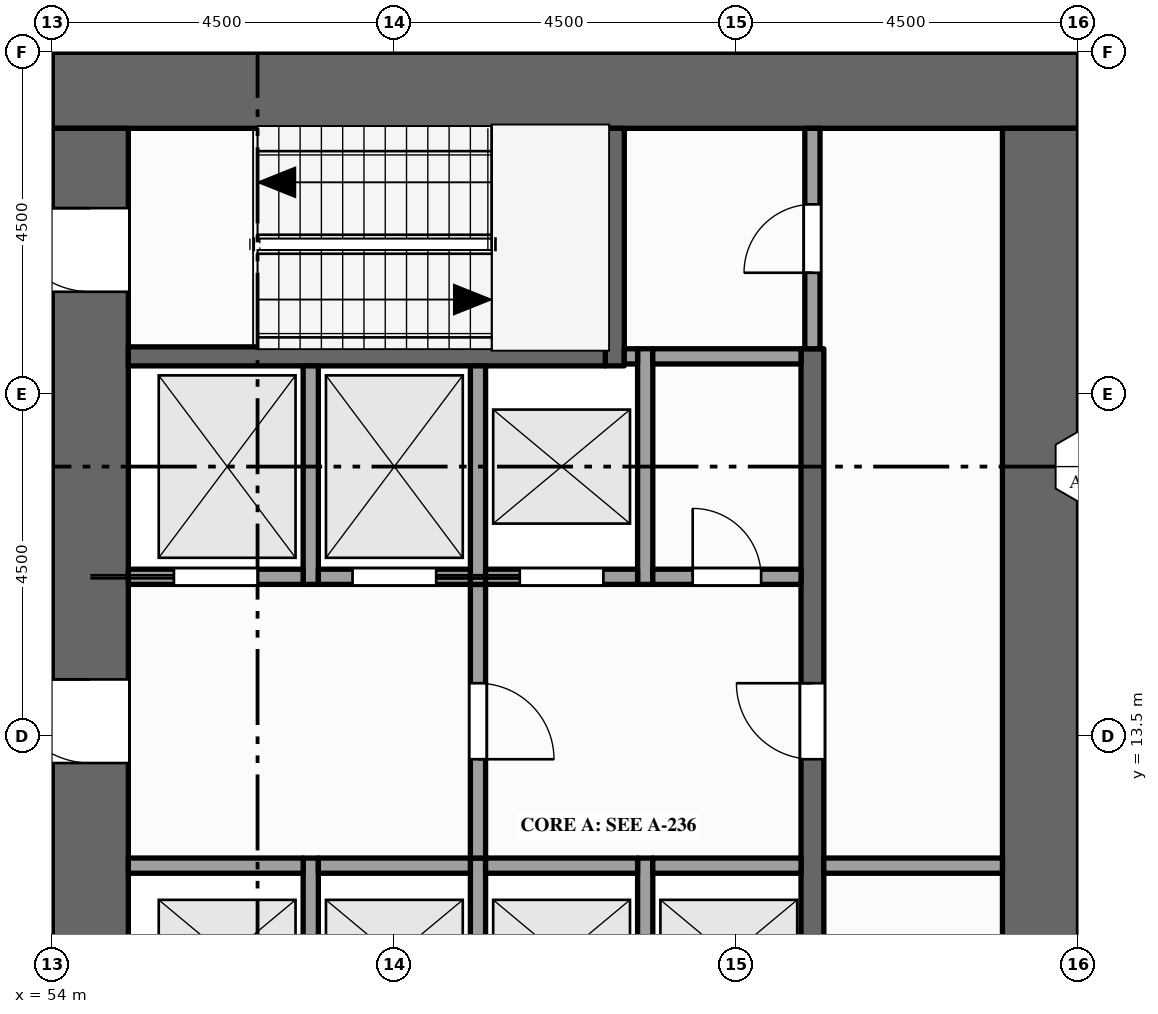
"""IFC4 building model, lengths in metres.
Left out: names, types, materials, properties, quantities, classifications, styles, units other than length and angle.
Written with IfcOpenShell. Run it as: python <this file> out.ifc"""

import sys

from ifc_helpers import new_model, si_unit, direction, frame, frame_2d, origin, place, context, subcontext, project, spatial, rectangle, extrude, element, fill, save


model = new_model("IFC4")
c1 = context("Model", 3, precision=1e-05, world=origin(), true_north=direction((0.0, 1.0)))
c2 = subcontext(c1, "Body", "Model", "MODEL_VIEW")
j1 = project(units=[si_unit("LENGTHUNIT", "METRE"), si_unit("PLANEANGLEUNIT", "RADIAN")], contexts=[c1])
p1 = place(None, origin())
s1 = spatial("IfcSite", under=j1, at=p1, CompositionType="ELEMENT")
p2 = place(p1, origin())
s2 = spatial("IfcBuilding", under=s1, at=p2, CompositionType="ELEMENT")
p3 = place(p2, frame((0.0, 0.0, 199.0)))
s3 = spatial("IfcBuildingStorey", under=s2, at=p3, CompositionType="ELEMENT", Elevation=199.0)
p4 = place(p3, frame((54.0, 22.0, -0.15), z_axis=(0.0, 0.0, 1.0), x_axis=(1.0, 0.0, 0.0)))
e1 = element("IfcWall", 1, at=p4, inside=s3, PredefinedType="SHEAR", context=c2, shape_type="SweptSolid", body=[
    extrude(rectangle(XDim=13.5, YDim=1.0, at=frame_2d((6.75, 0.0))), origin(), (0.0, 0.0, 1.0), 4.0),
])
p5 = place(p3, frame((54.5, 1.0, -0.15), z_axis=(0.0, 0.0, 1.0), x_axis=(0.0, 1.0, 0.0)))
e2 = element("IfcWall", 2, at=p5, inside=s3, PredefinedType="SHEAR", context=c2, shape_type="SweptSolid", body=[
    extrude(rectangle(XDim=20.5, YDim=1.0, at=frame_2d((10.25, 0.0))), origin(), (0.0, 0.0, 1.0), 4.0),
])
p6 = place(p5, frame((6.1, 0.0, 0.15)))
e3 = element("IfcOpeningElement", 3, at=p6, cuts=e2, PredefinedType="OPENING", context=c2, shape_type="SweptSolid", body=[
    extrude(rectangle(XDim=1.8, YDim=2.1, at=frame_2d((0.9, 1.05))), frame((0.0, 0.51, 0.0), z_axis=(0.0, -1.0, 0.0), x_axis=(1.0, 0.0, 0.0)), (0.0, 0.0, 1.0), 1.02),
])
p7 = place(p5, frame((12.15, 0.0, 0.15)))
e4 = element("IfcOpeningElement", 4, at=p7, cuts=e2, PredefinedType="OPENING", context=c2, shape_type="SweptSolid", body=[
    extrude(rectangle(XDim=1.1, YDim=2.1, at=frame_2d((0.55, 1.05))), frame((0.0, 0.51, 0.0), z_axis=(0.0, -1.0, 0.0), x_axis=(1.0, 0.0, 0.0)), (0.0, 0.0, 1.0), 1.02),
])
p8 = place(p5, frame((1.15, 0.0, 0.15)))
e5 = element("IfcOpeningElement", 5, at=p8, cuts=e2, PredefinedType="OPENING", context=c2, shape_type="SweptSolid", body=[
    extrude(rectangle(XDim=1.1, YDim=2.1, at=frame_2d((0.55, 1.05))), frame((0.0, 0.51, 0.0), z_axis=(0.0, -1.0, 0.0), x_axis=(1.0, 0.0, 0.0)), (0.0, 0.0, 1.0), 1.02),
])
p9 = place(p5, frame((18.35, 0.0, 0.15)))
e6 = element("IfcOpeningElement", 6, at=p9, cuts=e2, PredefinedType="OPENING", context=c2, shape_type="SweptSolid", body=[
    extrude(rectangle(XDim=1.1, YDim=2.1, at=frame_2d((0.55, 1.05))), frame((0.0, 0.51, 0.0), z_axis=(0.0, -1.0, 0.0), x_axis=(1.0, 0.0, 0.0)), (0.0, 0.0, 1.0), 1.02),
])
p10 = place(p3, frame((67.0, 1.0, -0.15), z_axis=(0.0, 0.0, 1.0), x_axis=(0.0, 1.0, 0.0)))
e7 = element("IfcWall", 7, at=p10, inside=s3, PredefinedType="SHEAR", context=c2, shape_type="SweptSolid", body=[
    extrude(rectangle(XDim=20.5, YDim=1.0, at=frame_2d((10.25, 0.0))), origin(), (0.0, 0.0, 1.0), 4.0),
])
p11 = place(p3, frame((57.4, 9.3, 0.0), z_axis=(0.0, 0.0, 1.0), x_axis=(0.0, 1.0, 0.0)))
e8 = element("IfcWall", 8, at=p11, inside=s3, PredefinedType="SOLIDWALL", context=c2, shape_type="SweptSolid", body=[
    extrude(rectangle(XDim=2.6, YDim=0.2, at=frame_2d((1.3, 0.0))), origin(), (0.0, 0.0, 1.0), 3.85),
])
p12 = place(p3, frame((57.4, 15.5, 0.0), z_axis=(0.0, 0.0, 1.0), x_axis=(0.0, 1.0, 0.0)))
e9 = element("IfcWall", 9, at=p12, inside=s3, PredefinedType="SOLIDWALL", context=c2, shape_type="SweptSolid", body=[
    extrude(rectangle(XDim=2.875, YDim=0.2, at=frame_2d((1.438, 0.0))), origin(), (0.0, 0.0, 1.0), 3.85),
])
p13 = place(p3, frame((59.6, 9.3, 0.0), z_axis=(0.0, 0.0, 1.0), x_axis=(0.0, 1.0, 0.0)))
e10 = element("IfcWall", 10, at=p13, inside=s3, PredefinedType="SOLIDWALL", context=c2, shape_type="SweptSolid", body=[
    extrude(rectangle(XDim=2.6, YDim=0.2, at=frame_2d((1.3, 0.0))), origin(), (0.0, 0.0, 1.0), 3.85),
])
p14 = place(p3, frame((59.6, 11.9, 0.0), z_axis=(0.0, 0.0, 1.0), x_axis=(0.0, 1.0, 0.0)))
e11 = element("IfcWall", 11, at=p14, inside=s3, PredefinedType="PARTITIONING", context=c2, shape_type="SweptSolid", body=[
    extrude(rectangle(XDim=3.6, YDim=0.2, at=frame_2d((1.8, 0.0))), origin(), (0.0, 0.0, 1.0), 3.85),
])
p15 = place(p14, frame((1.3, 0.0, 0.0)))
e12 = element("IfcOpeningElement", 12, at=p15, cuts=e11, PredefinedType="OPENING", context=c2, shape_type="SweptSolid", body=[
    extrude(rectangle(XDim=1.0, YDim=2.1, at=frame_2d((0.5, 1.05))), frame((0.0, 0.11, 0.0), z_axis=(0.0, -1.0, 0.0), x_axis=(1.0, 0.0, 0.0)), (0.0, 0.0, 1.0), 0.22),
])
p16 = place(p3, frame((59.6, 15.5, 0.0), z_axis=(0.0, 0.0, 1.0), x_axis=(0.0, 1.0, 0.0)))
e13 = element("IfcWall", 13, at=p16, inside=s3, PredefinedType="SOLIDWALL", context=c2, shape_type="SweptSolid", body=[
    extrude(rectangle(XDim=2.875, YDim=0.2, at=frame_2d((1.438, 0.0))), origin(), (0.0, 0.0, 1.0), 3.85),
])
p17 = place(p3, frame((61.4, 18.375, 0.0), z_axis=(0.0, 0.0, 1.0), x_axis=(0.0, 1.0, 0.0)))
e14 = element("IfcWall", 14, at=p17, inside=s3, PredefinedType="SHEAR", context=c2, shape_type="SweptSolid", body=[
    extrude(rectangle(XDim=3.125, YDim=0.25, at=frame_2d((1.562, 0.0))), origin(), (0.0, 0.0, 1.0), 3.85),
])
p18 = place(p3, frame((61.8, 9.3, 0.0), z_axis=(0.0, 0.0, 1.0), x_axis=(0.0, 1.0, 0.0)))
e15 = element("IfcWall", 15, at=p18, inside=s3, PredefinedType="SOLIDWALL", context=c2, shape_type="SweptSolid", body=[
    extrude(rectangle(XDim=2.6, YDim=0.2, at=frame_2d((1.3, 0.0))), origin(), (0.0, 0.0, 1.0), 3.85),
])
p19 = place(p3, frame((61.8, 15.5, 0.0), z_axis=(0.0, 0.0, 1.0), x_axis=(0.0, 1.0, 0.0)))
e16 = element("IfcWall", 16, at=p19, inside=s3, PredefinedType="SOLIDWALL", context=c2, shape_type="SweptSolid", body=[
    extrude(rectangle(XDim=3.1, YDim=0.2, at=frame_2d((1.55, 0.0))), origin(), (0.0, 0.0, 1.0), 3.85),
])
p20 = place(p3, frame((64.0, 4.1, 0.0), z_axis=(0.0, 0.0, 1.0), x_axis=(0.0, 1.0, 0.0)))
e17 = element("IfcWall", 17, at=p20, inside=s3, PredefinedType="SHEAR", context=c2, shape_type="SweptSolid", body=[
    extrude(rectangle(XDim=14.5, YDim=0.3, at=frame_2d((7.25, 0.0))), origin(), (0.0, 0.0, 1.0), 3.85),
])
p21 = place(p20, frame((3.4, 0.0, 0.0)))
e18 = element("IfcOpeningElement", 18, at=p21, cuts=e17, PredefinedType="OPENING", context=c2, shape_type="SweptSolid", body=[
    extrude(rectangle(XDim=1.0, YDim=2.1, at=frame_2d((0.5, 1.05))), frame((0.0, 0.16, 0.0), z_axis=(0.0, -1.0, 0.0), x_axis=(1.0, 0.0, 0.0)), (0.0, 0.0, 1.0), 0.32),
])
p22 = place(p20, frame((9.1, 0.0, 0.0)))
e19 = element("IfcOpeningElement", 19, at=p22, cuts=e17, PredefinedType="OPENING", context=c2, shape_type="SweptSolid", body=[
    extrude(rectangle(XDim=1.0, YDim=2.1, at=frame_2d((0.5, 1.05))), frame((0.0, 0.16, 0.0), z_axis=(0.0, -1.0, 0.0), x_axis=(1.0, 0.0, 0.0)), (0.0, 0.0, 1.0), 0.32),
])
p23 = place(p3, frame((64.0, 18.6, 0.0), z_axis=(0.0, 0.0, 1.0), x_axis=(0.0, 1.0, 0.0)))
e20 = element("IfcWall", 20, at=p23, inside=s3, PredefinedType="PARTITIONING", context=c2, shape_type="SweptSolid", body=[
    extrude(rectangle(XDim=2.9, YDim=0.2, at=frame_2d((1.45, 0.0))), origin(), (0.0, 0.0, 1.0), 3.85),
])
p24 = place(p23, frame((1.0, 0.0, 0.0)))
e21 = element("IfcOpeningElement", 21, at=p24, cuts=e20, PredefinedType="OPENING", context=c2, shape_type="SweptSolid", body=[
    extrude(rectangle(XDim=0.9, YDim=2.1, at=frame_2d((0.45, 1.05))), frame((0.0, 0.11, 0.0), z_axis=(0.0, -1.0, 0.0), x_axis=(1.0, 0.0, 0.0)), (0.0, 0.0, 1.0), 0.22),
])
p25 = place(p3, frame((55.0, 11.8, 0.0), z_axis=(0.0, 0.0, 1.0), x_axis=(1.0, 0.0, 0.0)))
e22 = element("IfcWall", 22, at=p25, inside=s3, PredefinedType="SOLIDWALL", context=c2, shape_type="SweptSolid", body=[
    extrude(rectangle(XDim=2.3, YDim=0.2, at=frame_2d((1.15, 0.0))), origin(), (0.0, 0.0, 1.0), 3.85),
])
for number, where, z_axis, x_axis in (
    (23, (57.5, 11.8, 0.0), (0.0, 0.0, 1.0), (1.0, 0.0, 0.0)),
    (24, (59.7, 11.8, 0.0), (0.0, 0.0, 1.0), (1.0, 0.0, 0.0)),
):
    element("IfcWall", number, at=place(p3, frame(where, z_axis=z_axis, x_axis=x_axis)), inside=s3, PredefinedType="SOLIDWALL", context=c2, shape_type="SweptSolid", body=[
        extrude(rectangle(XDim=2.0, YDim=0.2, at=frame_2d((1.0, 0.0))), origin(), (0.0, 0.0, 1.0), 3.85),
    ])
p26 = place(p3, frame((61.9, 11.8, 0.0), z_axis=(0.0, 0.0, 1.0), x_axis=(1.0, 0.0, 0.0)))
e25 = element("IfcWall", 25, at=p26, inside=s3, PredefinedType="SOLIDWALL", context=c2, shape_type="SweptSolid", body=[
    extrude(rectangle(XDim=1.95, YDim=0.2, at=frame_2d((0.975, 0.0))), origin(), (0.0, 0.0, 1.0), 3.85),
])
p27 = place(p3, frame((64.15, 11.8, 0.0), z_axis=(0.0, 0.0, 1.0), x_axis=(1.0, 0.0, 0.0)))
e26 = element("IfcWall", 26, at=p27, inside=s3, PredefinedType="PARTITIONING", context=c2, shape_type="SweptSolid", body=[
    extrude(rectangle(XDim=2.35, YDim=0.2, at=frame_2d((1.175, 0.0))), origin(), (0.0, 0.0, 1.0), 3.85),
])
p28 = place(p3, frame((55.0, 15.6, 0.0), z_axis=(0.0, 0.0, 1.0), x_axis=(1.0, 0.0, 0.0)))
e27 = element("IfcWall", 27, at=p28, inside=s3, PredefinedType="SOLIDWALL", context=c2, shape_type="SweptSolid", body=[
    extrude(rectangle(XDim=2.3, YDim=0.2, at=frame_2d((1.15, 0.0))), origin(), (0.0, 0.0, 1.0), 3.85),
])
p29 = place(p28, frame((0.6, 0.0, 0.012)))
e28 = element("IfcOpeningElement", 28, at=p29, cuts=e27, PredefinedType="OPENING", context=c2, shape_type="SweptSolid", body=[
    extrude(rectangle(XDim=1.1, YDim=2.1, at=frame_2d((0.55, 1.05))), frame((0.0, 0.11, 0.0), z_axis=(0.0, -1.0, 0.0), x_axis=(1.0, 0.0, 0.0)), (0.0, 0.0, 1.0), 0.22),
])
p30 = place(p3, frame((57.5, 15.6, 0.0), z_axis=(0.0, 0.0, 1.0), x_axis=(1.0, 0.0, 0.0)))
e29 = element("IfcWall", 29, at=p30, inside=s3, PredefinedType="SOLIDWALL", context=c2, shape_type="SweptSolid", body=[
    extrude(rectangle(XDim=2.0, YDim=0.2, at=frame_2d((1.0, 0.0))), origin(), (0.0, 0.0, 1.0), 3.85),
])
p31 = place(p30, frame((0.45, 0.0, 0.012)))
e30 = element("IfcOpeningElement", 30, at=p31, cuts=e29, PredefinedType="OPENING", context=c2, shape_type="SweptSolid", body=[
    extrude(rectangle(XDim=1.1, YDim=2.1, at=frame_2d((0.55, 1.05))), frame((0.0, 0.11, 0.0), z_axis=(0.0, -1.0, 0.0), x_axis=(1.0, 0.0, 0.0)), (0.0, 0.0, 1.0), 0.22),
])
p32 = place(p3, frame((59.7, 15.6, 0.0), z_axis=(0.0, 0.0, 1.0), x_axis=(1.0, 0.0, 0.0)))
e31 = element("IfcWall", 31, at=p32, inside=s3, PredefinedType="SOLIDWALL", context=c2, shape_type="SweptSolid", body=[
    extrude(rectangle(XDim=2.0, YDim=0.2, at=frame_2d((1.0, 0.0))), origin(), (0.0, 0.0, 1.0), 3.85),
])
p33 = place(p32, frame((0.45, 0.0, 0.012)))
e32 = element("IfcOpeningElement", 32, at=p33, cuts=e31, PredefinedType="OPENING", context=c2, shape_type="SweptSolid", body=[
    extrude(rectangle(XDim=1.1, YDim=2.1, at=frame_2d((0.55, 1.05))), frame((0.0, 0.11, 0.0), z_axis=(0.0, -1.0, 0.0), x_axis=(1.0, 0.0, 0.0)), (0.0, 0.0, 1.0), 0.22),
])
p34 = place(p3, frame((61.9, 15.6, 0.0), z_axis=(0.0, 0.0, 1.0), x_axis=(1.0, 0.0, 0.0)))
e33 = element("IfcWall", 33, at=p34, inside=s3, PredefinedType="PARTITIONING", context=c2, shape_type="SweptSolid", body=[
    extrude(rectangle(XDim=1.95, YDim=0.2, at=frame_2d((0.975, 0.0))), origin(), (0.0, 0.0, 1.0), 3.85),
])
p35 = place(p34, frame((0.525, 0.0, 0.0)))
e34 = element("IfcOpeningElement", 34, at=p35, cuts=e33, PredefinedType="OPENING", context=c2, shape_type="SweptSolid", body=[
    extrude(rectangle(XDim=0.9, YDim=2.1, at=frame_2d((0.45, 1.05))), frame((0.0, 0.11, 0.0), z_axis=(0.0, -1.0, 0.0), x_axis=(1.0, 0.0, 0.0)), (0.0, 0.0, 1.0), 0.22),
])
p36 = place(p3, frame((55.0, 18.5, 0.0), z_axis=(0.0, 0.0, 1.0), x_axis=(1.0, 0.0, 0.0)))
e35 = element("IfcWall", 35, at=p36, inside=s3, PredefinedType="SHEAR", context=c2, shape_type="SweptSolid", body=[
    extrude(rectangle(XDim=6.275, YDim=0.25, at=frame_2d((3.137, 0.0))), origin(), (0.0, 0.0, 1.0), 3.85),
])
p37 = place(p3, frame((61.525, 18.5, 0.0), z_axis=(0.0, 0.0, 1.0), x_axis=(1.0, 0.0, 0.0)))
e36 = element("IfcWall", 36, at=p37, inside=s3, PredefinedType="SOLIDWALL", context=c2, shape_type="SweptSolid", body=[
    extrude(rectangle(XDim=0.175, YDim=0.2, at=frame_2d((0.087, 0.0))), origin(), (0.0, 0.0, 1.0), 3.85),
])
p38 = place(p3, frame((61.9, 18.5, 0.0), z_axis=(0.0, 0.0, 1.0), x_axis=(1.0, 0.0, 0.0)))
e37 = element("IfcWall", 37, at=p38, inside=s3, PredefinedType="PARTITIONING", context=c2, shape_type="SweptSolid", body=[
    extrude(rectangle(XDim=1.95, YDim=0.2, at=frame_2d((0.975, 0.0))), origin(), (0.0, 0.0, 1.0), 3.85),
])
p39 = place(p29, origin())
e38 = element("IfcDoor", 38, at=p39, inside=s3, OperationType="SLIDING_TO_LEFT", PredefinedType="DOOR", context=c2, shape_type="SweptSolid", body=[
    extrude(rectangle(XDim=1.1, YDim=2.1, at=frame_2d((0.55, 1.05))), frame((0.0, 0.025, 0.0), z_axis=(0.0, -1.0, 0.0), x_axis=(1.0, 0.0, 0.0)), (0.0, 0.0, 1.0), 0.05),
])
fill(e28, e38)
p40 = place(p31, origin())
e39 = element("IfcDoor", 39, at=p40, inside=s3, OperationType="SLIDING_TO_RIGHT", PredefinedType="DOOR", context=c2, shape_type="SweptSolid", body=[
    extrude(rectangle(XDim=1.1, YDim=2.1, at=frame_2d((0.55, 1.05))), frame((0.0, 0.025, 0.0), z_axis=(0.0, -1.0, 0.0), x_axis=(1.0, 0.0, 0.0)), (0.0, 0.0, 1.0), 0.05),
])
fill(e30, e39)
p41 = place(p33, origin())
e40 = element("IfcDoor", 40, at=p41, inside=s3, OperationType="SLIDING_TO_LEFT", PredefinedType="DOOR", context=c2, shape_type="SweptSolid", body=[
    extrude(rectangle(XDim=1.1, YDim=2.1, at=frame_2d((0.55, 1.05))), frame((0.0, 0.025, 0.0), z_axis=(0.0, -1.0, 0.0), x_axis=(1.0, 0.0, 0.0)), (0.0, 0.0, 1.0), 0.05),
])
fill(e32, e40)
p42 = place(p7, origin())
e41 = element("IfcDoor", 41, at=p42, inside=s3, OperationType="SINGLE_SWING_RIGHT", PredefinedType="DOOR", context=c2, shape_type="SweptSolid", body=[
    extrude(rectangle(XDim=1.1, YDim=2.1, at=frame_2d((0.55, 1.05))), frame((0.0, 0.025, 0.0), z_axis=(0.0, -1.0, 0.0), x_axis=(1.0, 0.0, 0.0)), (0.0, 0.0, 1.0), 0.05),
])
fill(e4, e41)
p43 = place(p15, origin())
e42 = element("IfcDoor", 42, at=p43, inside=s3, OperationType="SINGLE_SWING_LEFT", PredefinedType="DOOR", context=c2, shape_type="SweptSolid", body=[
    extrude(rectangle(XDim=1.0, YDim=2.1, at=frame_2d((0.5, 1.05))), frame((0.0, 0.025, 0.0), z_axis=(0.0, -1.0, 0.0), x_axis=(1.0, 0.0, 0.0)), (0.0, 0.0, 1.0), 0.05),
])
fill(e12, e42)
p44 = place(p22, origin())
e43 = element("IfcDoor", 43, at=p44, inside=s3, OperationType="SINGLE_SWING_RIGHT", PredefinedType="DOOR", context=c2, shape_type="SweptSolid", body=[
    extrude(rectangle(XDim=1.0, YDim=2.1, at=frame_2d((0.5, 1.05))), frame((0.0, 0.025, 0.0), z_axis=(0.0, -1.0, 0.0), x_axis=(1.0, 0.0, 0.0)), (0.0, 0.0, 1.0), 0.05),
])
fill(e19, e43)
p45 = place(p9, origin())
e44 = element("IfcDoor", 44, at=p45, inside=s3, OperationType="SINGLE_SWING_RIGHT", PredefinedType="DOOR", context=c2, shape_type="SweptSolid", body=[
    extrude(rectangle(XDim=1.1, YDim=2.1, at=frame_2d((0.55, 1.05))), frame((0.0, 0.025, 0.0), z_axis=(0.0, -1.0, 0.0), x_axis=(1.0, 0.0, 0.0)), (0.0, 0.0, 1.0), 0.05),
])
fill(e6, e44)
p46 = place(p24, origin())
e45 = element("IfcDoor", 45, at=p46, inside=s3, OperationType="SINGLE_SWING_LEFT", PredefinedType="DOOR", context=c2, shape_type="SweptSolid", body=[
    extrude(rectangle(XDim=0.9, YDim=2.1, at=frame_2d((0.45, 1.05))), frame((0.0, 0.025, 0.0), z_axis=(0.0, -1.0, 0.0), x_axis=(1.0, 0.0, 0.0)), (0.0, 0.0, 1.0), 0.05),
])
fill(e21, e45)
p47 = place(p35, origin())
e46 = element("IfcDoor", 46, at=p47, inside=s3, OperationType="SINGLE_SWING_LEFT", PredefinedType="DOOR", context=c2, shape_type="SweptSolid", body=[
    extrude(rectangle(XDim=0.9, YDim=2.1, at=frame_2d((0.45, 1.05))), frame((0.0, 0.025, 0.0), z_axis=(0.0, -1.0, 0.0), x_axis=(1.0, 0.0, 0.0)), (0.0, 0.0, 1.0), 0.05),
])
fill(e34, e46)
save(model, sys.argv[1])
